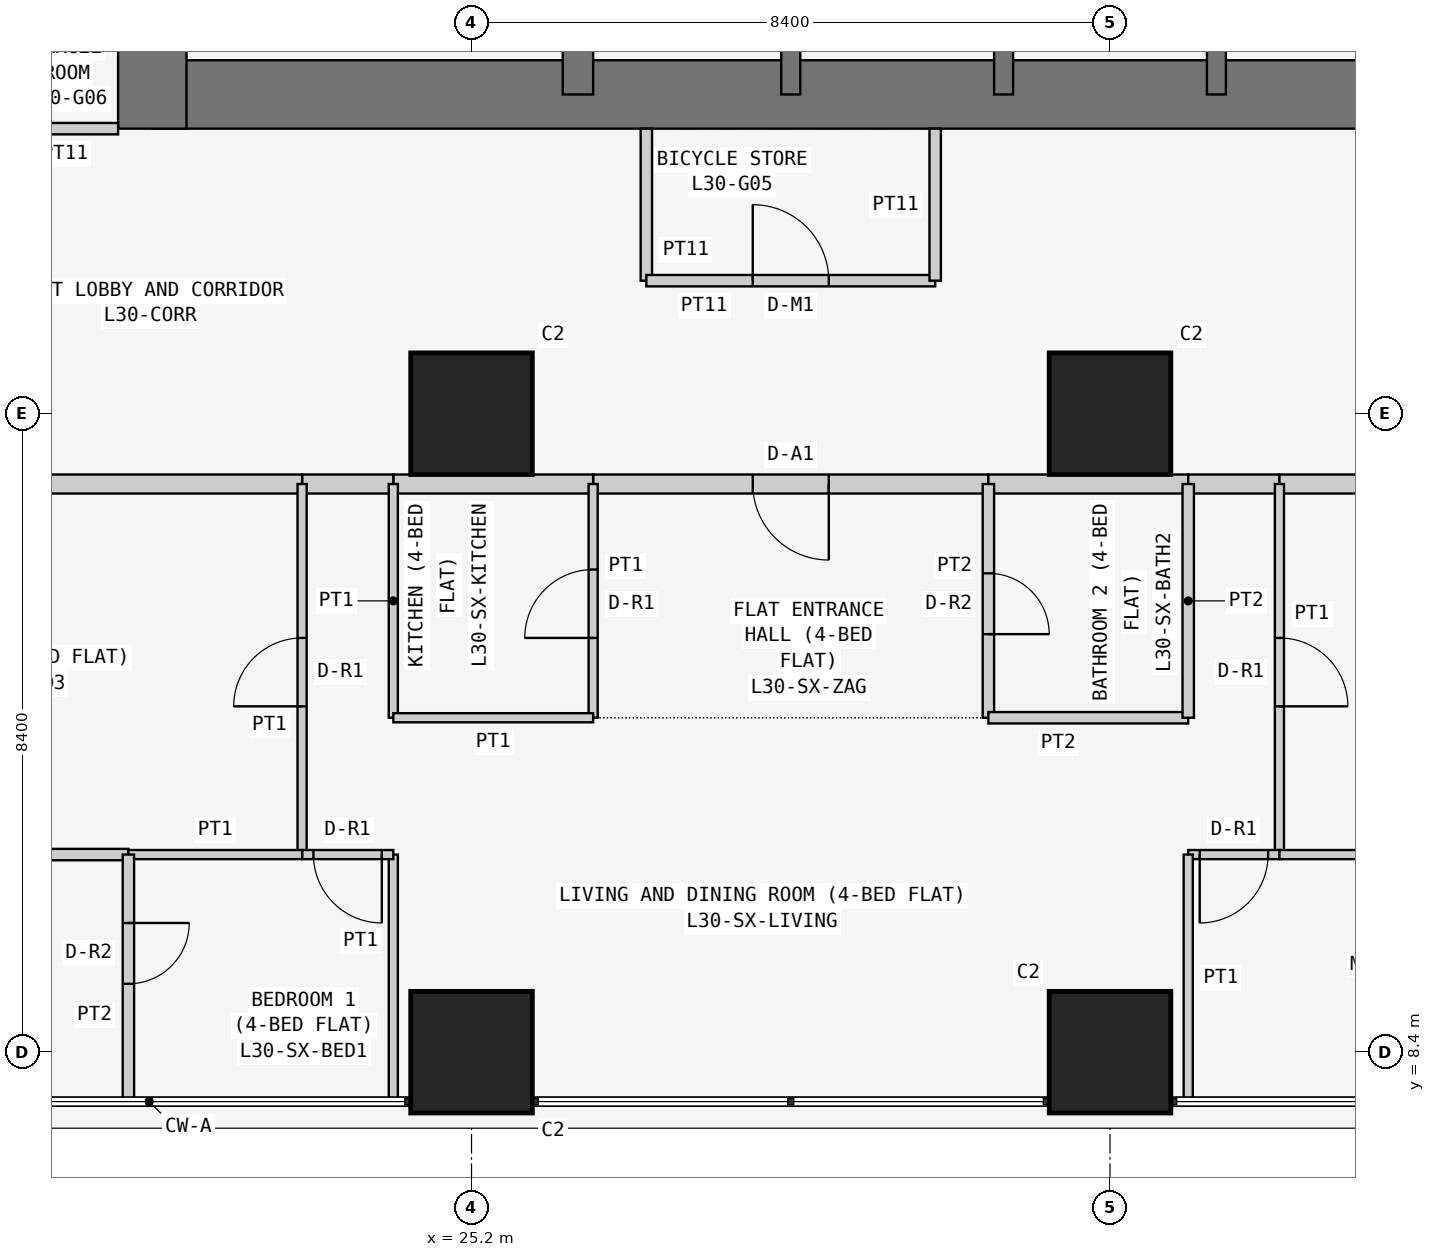
"""IFC4 building model, lengths in metres.
Left out: names, types, materials, properties, quantities, classifications, styles, units other than length and angle.
Written with IfcOpenShell. Run it as: python <this file> out.ifc"""

import sys

from ifc_helpers import new_model, si_unit, direction, frame, frame_2d, origin, origin_2d, place, context, subcontext, project, spatial, rectangle, extrude, element, fill, save


model = new_model("IFC4")
c1 = context("Model", 3, precision=1e-05, world=origin(), true_north=direction((0.0, 1.0)))
c2 = subcontext(c1, "Body", "Model", "MODEL_VIEW")
j1 = project(units=[si_unit("LENGTHUNIT", "METRE"), si_unit("PLANEANGLEUNIT", "RADIAN")], contexts=[c1])
p1 = place(None, origin())
s1 = spatial("IfcSite", under=j1, at=p1, CompositionType="ELEMENT")
p2 = place(p1, origin())
s2 = spatial("IfcBuilding", under=s1, at=p2, CompositionType="ELEMENT")
p3 = place(p2, frame((0.0, 0.0, 119.7)))
s3 = spatial("IfcBuildingStorey", under=s2, at=p3, CompositionType="ELEMENT", Elevation=119.7)
for number, where, z_axis, x_axis in (
    (1, (25.2, 8.4, 0.0), (0.0, 0.0, 1.0), (1.0, 0.0, 0.0)),
    (2, (25.2, 16.8, 0.0), (0.0, 0.0, 1.0), (1.0, 0.0, 0.0)),
    (3, (33.6, 8.4, 0.0), (0.0, 0.0, 1.0), (1.0, 0.0, 0.0)),
    (4, (33.6, 16.8, 0.0), (0.0, 0.0, 1.0), (1.0, 0.0, 0.0)),
):
    element("IfcColumn", number, at=place(p3, frame(where, z_axis=z_axis, x_axis=x_axis)), inside=s3, PredefinedType="COLUMN", context=c2, shape_type="SweptSolid", body=[
        extrude(rectangle(XDim=1.6, YDim=1.6, at=origin_2d()), origin(), (0.0, 0.0, 1.0), 3.6),
    ])
p4 = place(p3, frame((21.0, 21.0, 0.0), z_axis=(0.0, 0.0, 1.0), x_axis=(1.0, 0.0, 0.0)))
e5 = element("IfcWall", 5, at=p4, inside=s3, PredefinedType="SHEAR", context=c2, shape_type="SweptSolid", body=[
    extrude(rectangle(XDim=17.25, YDim=0.9, at=frame_2d((8.625, 0.0))), origin(), (0.0, 0.0, 1.0), 3.6),
])
p5 = place(p3, frame((21.0, 37.8, 0.0), z_axis=(0.0, 0.0, 1.0), x_axis=(0.0, -1.0, 0.0)))
e6 = element("IfcWall", 6, at=p5, inside=s3, PredefinedType="SHEAR", context=c2, shape_type="SweptSolid", body=[
    extrude(rectangle(XDim=17.25, YDim=0.9, at=frame_2d((8.625, 0.0))), origin(), (0.0, 0.0, 1.0), 3.6),
])
p6 = place(p5, frame((5.4, 0.0, 0.0)))
e7 = element("IfcOpeningElement", 7, at=p6, cuts=e6, PredefinedType="OPENING", context=c2, shape_type="SweptSolid", body=[
    extrude(rectangle(XDim=1.2, YDim=2.1, at=frame_2d((0.6, 1.05))), frame((0.0, 0.46, 0.0), z_axis=(0.0, -1.0, 0.0), x_axis=(1.0, 0.0, 0.0)), (0.0, 0.0, 1.0), 0.92),
])
p7 = place(p3, frame((26.6, 21.0, 0.0), z_axis=(0.0, 0.0, 1.0), x_axis=(0.0, 1.0, 0.0)))
e8 = element("IfcWall", 8, at=p7, inside=s3, PredefinedType="SHEAR", context=c2, shape_type="SweptSolid", body=[
    extrude(rectangle(XDim=16.8, YDim=0.4, at=frame_2d((8.4, 0.0))), origin(), (0.0, 0.0, 1.0), 3.6),
])
p8 = place(p7, frame((10.4, 0.0, 0.0)))
e9 = element("IfcOpeningElement", 9, at=p8, cuts=e8, PredefinedType="OPENING", context=c2, shape_type="SweptSolid", body=[
    extrude(rectangle(XDim=1.2, YDim=2.1, at=frame_2d((0.6, 1.05))), frame((0.0, 0.21, 0.0), z_axis=(0.0, -1.0, 0.0), x_axis=(1.0, 0.0, 0.0)), (0.0, 0.0, 1.0), 0.42),
])
for number, where, z_axis, x_axis in (
    (10, (29.4, 21.0, 0.0), (0.0, 0.0, 1.0), (0.0, 1.0, 0.0)),
    (11, (32.2, 21.0, 0.0), (0.0, 0.0, 1.0), (0.0, 1.0, 0.0)),
    (12, (35.0, 21.0, 0.0), (0.0, 0.0, 1.0), (0.0, 1.0, 0.0)),
):
    element("IfcWall", number, at=place(p3, frame(where, z_axis=z_axis, x_axis=x_axis)), inside=s3, PredefinedType="SHEAR", context=c2, shape_type="SweptSolid", body=[
        extrude(rectangle(XDim=3.2, YDim=0.25, at=frame_2d((1.6, 0.0))), origin(), (0.0, 0.0, 1.0), 3.6),
    ])
p9 = place(p3, frame((27.5, 20.55, 0.0), z_axis=(0.0, 0.0, 1.0), x_axis=(0.0, -1.0, 0.0)))
e13 = element("IfcWall", 13, at=p9, inside=s3, PredefinedType="PARTITIONING", context=c2, shape_type="SweptSolid", body=[
    extrude(rectangle(XDim=2.0, YDim=0.15, at=frame_2d((1.0, 0.0))), origin(), (0.0, 0.0, 1.0), 3.45),
])
p10 = place(p3, frame((27.5, 18.55, 0.0), z_axis=(0.0, 0.0, 1.0), x_axis=(1.0, 0.0, 0.0)))
e14 = element("IfcWall", 14, at=p10, inside=s3, PredefinedType="PARTITIONING", context=c2, shape_type="SweptSolid", body=[
    extrude(rectangle(XDim=3.8, YDim=0.15, at=frame_2d((1.9, 0.0))), origin(), (0.0, 0.0, 1.0), 3.45),
])
p11 = place(p10, frame((1.4, 0.0, 0.0)))
e15 = element("IfcOpeningElement", 15, at=p11, cuts=e14, PredefinedType="OPENING", context=c2, shape_type="SweptSolid", body=[
    extrude(rectangle(XDim=1.0, YDim=2.1, at=frame_2d((0.5, 1.05))), frame((0.0, 0.085, 0.0), z_axis=(0.0, -1.0, 0.0), x_axis=(1.0, 0.0, 0.0)), (0.0, 0.0, 1.0), 0.17),
])
p12 = place(p3, frame((31.3, 18.55, 0.0), z_axis=(0.0, 0.0, 1.0), x_axis=(0.0, 1.0, 0.0)))
e16 = element("IfcWall", 16, at=p12, inside=s3, PredefinedType="PARTITIONING", context=c2, shape_type="SweptSolid", body=[
    extrude(rectangle(XDim=2.0, YDim=0.15, at=frame_2d((1.0, 0.0))), origin(), (0.0, 0.0, 1.0), 3.45),
])
p13 = place(p3, frame((19.15, 20.55, 0.0), z_axis=(0.0, 0.0, 1.0), x_axis=(1.0, 0.0, 0.0)))
e17 = element("IfcWall", 17, at=p13, inside=s3, PredefinedType="PARTITIONING", context=c2, shape_type="SweptSolid", body=[
    extrude(rectangle(XDim=1.4, YDim=0.15, at=frame_2d((0.7, 0.0))), origin(), (0.0, 0.0, 1.0), 3.45),
])
p14 = place(p3, frame((32.0, 15.875, 0.0), z_axis=(0.0, 0.0, 1.0), x_axis=(-1.0, 0.0, 0.0)))
e18 = element("IfcWall", 18, at=p14, inside=s3, PredefinedType="PARTITIONING", context=c2, shape_type="SweptSolid", body=[
    extrude(rectangle(XDim=5.2, YDim=0.25, at=frame_2d((2.6, 0.0))), origin(), (0.0, 0.0, 1.0), 3.45),
])
p15 = place(p14, frame((2.1, 0.0, 0.0)))
e19 = element("IfcOpeningElement", 19, at=p15, cuts=e18, PredefinedType="OPENING", context=c2, shape_type="SweptSolid", body=[
    extrude(rectangle(XDim=1.0, YDim=2.1, at=frame_2d((0.5, 1.05))), frame((0.0, 0.135, 0.0), z_axis=(0.0, -1.0, 0.0), x_axis=(1.0, 0.0, 0.0)), (0.0, 0.0, 1.0), 0.27),
])
p16 = place(p3, frame((34.629, 15.875, 0.0), z_axis=(0.0, 0.0, 1.0), x_axis=(-1.0, 0.0, 0.0)))
e20 = element("IfcWall", 20, at=p16, inside=s3, PredefinedType="PARTITIONING", context=c2, shape_type="SweptSolid", body=[
    extrude(rectangle(XDim=2.629, YDim=0.25, at=frame_2d((1.314, 0.0))), origin(), (0.0, 0.0, 1.0), 3.45),
])
p17 = place(p3, frame((26.8, 15.875, 0.0), z_axis=(0.0, 0.0, 1.0), x_axis=(-1.0, 0.0, 0.0)))
e21 = element("IfcWall", 21, at=p17, inside=s3, PredefinedType="PARTITIONING", context=c2, shape_type="SweptSolid", body=[
    extrude(rectangle(XDim=2.629, YDim=0.25, at=frame_2d((1.314, 0.0))), origin(), (0.0, 0.0, 1.0), 3.45),
])
p18 = place(p3, frame((24.171, 15.875, 0.0), z_axis=(0.0, 0.0, 1.0), x_axis=(-1.0, 0.0, 0.0)))
e22 = element("IfcWall", 22, at=p18, inside=s3, PredefinedType="PARTITIONING", context=c2, shape_type="SweptSolid", body=[
    extrude(rectangle(XDim=1.2, YDim=0.25, at=frame_2d((0.6, 0.0))), origin(), (0.0, 0.0, 1.0), 3.45),
])
p19 = place(p3, frame((35.829, 15.875, 0.0), z_axis=(0.0, 0.0, 1.0), x_axis=(-1.0, 0.0, 0.0)))
e23 = element("IfcWall", 23, at=p19, inside=s3, PredefinedType="PARTITIONING", context=c2, shape_type="SweptSolid", body=[
    extrude(rectangle(XDim=1.2, YDim=0.25, at=frame_2d((0.6, 0.0))), origin(), (0.0, 0.0, 1.0), 3.45),
])
for number, where, z_axis, x_axis in (
    (24, (42.7, 15.875, 0.0), (0.0, 0.0, 1.0), (-1.0, 0.0, 0.0)),
    (25, (22.971, 15.875, 0.0), (0.0, 0.0, 1.0), (-1.0, 0.0, 0.0)),
):
    element("IfcWall", number, at=place(p3, frame(where, z_axis=z_axis, x_axis=x_axis)), inside=s3, PredefinedType="PARTITIONING", context=c2, shape_type="SweptSolid", body=[
        extrude(rectangle(XDim=6.871, YDim=0.25, at=frame_2d((3.436, 0.0))), origin(), (0.0, 0.0, 1.0), 3.45),
    ])
p20 = place(p3, frame((32.0, 12.8, 0.0), z_axis=(0.0, 0.0, 1.0), x_axis=(0.0, 1.0, 0.0)))
e26 = element("IfcWall", 26, at=p20, inside=s3, PredefinedType="PARTITIONING", context=c2, shape_type="SweptSolid", body=[
    extrude(rectangle(XDim=3.075, YDim=0.15, at=frame_2d((1.538, 0.0))), origin(), (0.0, 0.0, 1.0), 3.45),
])
p21 = place(p20, frame((1.1, 0.0, 0.0)))
e27 = element("IfcOpeningElement", 27, at=p21, cuts=e26, PredefinedType="OPENING", context=c2, shape_type="SweptSolid", body=[
    extrude(rectangle(XDim=0.8, YDim=2.1, at=frame_2d((0.4, 1.05))), frame((0.0, 0.085, 0.0), z_axis=(0.0, -1.0, 0.0), x_axis=(1.0, 0.0, 0.0)), (0.0, 0.0, 1.0), 0.17),
])
p22 = place(p3, frame((26.8, 15.875, 0.0), z_axis=(0.0, 0.0, 1.0), x_axis=(0.0, -1.0, 0.0)))
e28 = element("IfcWall", 28, at=p22, inside=s3, PredefinedType="PARTITIONING", context=c2, shape_type="SweptSolid", body=[
    extrude(rectangle(XDim=3.075, YDim=0.12, at=frame_2d((1.538, 0.0))), origin(), (0.0, 0.0, 1.0), 3.45),
])
p23 = place(p22, frame((1.125, 0.0, 0.0)))
e29 = element("IfcOpeningElement", 29, at=p23, cuts=e28, PredefinedType="OPENING", context=c2, shape_type="SweptSolid", body=[
    extrude(rectangle(XDim=0.9, YDim=2.1, at=frame_2d((0.45, 1.05))), frame((0.0, 0.07, 0.0), z_axis=(0.0, -1.0, 0.0), x_axis=(1.0, 0.0, 0.0)), (0.0, 0.0, 1.0), 0.14),
])
p24 = place(p3, frame((32.0, 12.8, 0.0), z_axis=(0.0, 0.0, 1.0), x_axis=(1.0, 0.0, 0.0)))
e30 = element("IfcWall", 30, at=p24, inside=s3, PredefinedType="PARTITIONING", context=c2, shape_type="SweptSolid", body=[
    extrude(rectangle(XDim=2.629, YDim=0.15, at=frame_2d((1.314, 0.0))), origin(), (0.0, 0.0, 1.0), 3.45),
])
p25 = place(p3, frame((34.629, 12.8, 0.0), z_axis=(0.0, 0.0, 1.0), x_axis=(0.0, 1.0, 0.0)))
e31 = element("IfcWall", 31, at=p25, inside=s3, PredefinedType="PARTITIONING", context=c2, shape_type="SweptSolid", body=[
    extrude(rectangle(XDim=3.075, YDim=0.15, at=frame_2d((1.538, 0.0))), origin(), (0.0, 0.0, 1.0), 3.45),
])
p26 = place(p3, frame((24.171, 15.875, 0.0), z_axis=(0.0, 0.0, 1.0), x_axis=(0.0, -1.0, 0.0)))
e32 = element("IfcWall", 32, at=p26, inside=s3, PredefinedType="PARTITIONING", context=c2, shape_type="SweptSolid", body=[
    extrude(rectangle(XDim=3.075, YDim=0.12, at=frame_2d((1.538, 0.0))), origin(), (0.0, 0.0, 1.0), 3.45),
])
p27 = place(p3, frame((24.171, 12.8, 0.0), z_axis=(0.0, 0.0, 1.0), x_axis=(1.0, 0.0, 0.0)))
e33 = element("IfcWall", 33, at=p27, inside=s3, PredefinedType="PARTITIONING", context=c2, shape_type="SweptSolid", body=[
    extrude(rectangle(XDim=2.629, YDim=0.12, at=frame_2d((1.314, 0.0))), origin(), (0.0, 0.0, 1.0), 3.45),
])
p28 = place(p3, frame((35.829, 15.875, 0.0), z_axis=(0.0, 0.0, 1.0), x_axis=(0.0, -1.0, 0.0)))
e34 = element("IfcWall", 34, at=p28, inside=s3, PredefinedType="PARTITIONING", context=c2, shape_type="SweptSolid", body=[
    extrude(rectangle(XDim=4.875, YDim=0.12, at=frame_2d((2.438, 0.0))), origin(), (0.0, 0.0, 1.0), 3.45),
])
p29 = place(p28, frame((2.025, 0.0, 0.0)))
e35 = element("IfcOpeningElement", 35, at=p29, cuts=e34, PredefinedType="OPENING", context=c2, shape_type="SweptSolid", body=[
    extrude(rectangle(XDim=0.9, YDim=2.1, at=frame_2d((0.45, 1.05))), frame((0.0, 0.07, 0.0), z_axis=(0.0, -1.0, 0.0), x_axis=(1.0, 0.0, 0.0)), (0.0, 0.0, 1.0), 0.14),
])
p30 = place(p3, frame((35.829, 11.0, 0.0), z_axis=(0.0, 0.0, 1.0), x_axis=(-1.0, 0.0, 0.0)))
e36 = element("IfcWall", 36, at=p30, inside=s3, PredefinedType="PARTITIONING", context=c2, shape_type="SweptSolid", body=[
    extrude(rectangle(XDim=1.2, YDim=0.12, at=frame_2d((0.6, 0.0))), origin(), (0.0, 0.0, 1.0), 3.45),
])
p31 = place(p30, frame((0.149, 0.0, 0.0)))
e37 = element("IfcOpeningElement", 37, at=p31, cuts=e36, PredefinedType="OPENING", context=c2, shape_type="SweptSolid", body=[
    extrude(rectangle(XDim=0.9, YDim=2.1, at=frame_2d((0.45, 1.05))), frame((0.0, 0.07, 0.0), z_axis=(0.0, -1.0, 0.0), x_axis=(1.0, 0.0, 0.0)), (0.0, 0.0, 1.0), 0.14),
])
p32 = place(p3, frame((34.629, 11.0, 0.0), z_axis=(0.0, 0.0, 1.0), x_axis=(0.0, -1.0, 0.0)))
e38 = element("IfcWall", 38, at=p32, inside=s3, PredefinedType="PARTITIONING", context=c2, shape_type="SweptSolid", body=[
    extrude(rectangle(XDim=3.25, YDim=0.12, at=frame_2d((1.625, 0.0))), origin(), (0.0, 0.0, 1.0), 3.45),
])
p33 = place(p3, frame((22.971, 11.0, 0.0), z_axis=(0.0, 0.0, 1.0), x_axis=(0.0, 1.0, 0.0)))
e39 = element("IfcWall", 39, at=p33, inside=s3, PredefinedType="PARTITIONING", context=c2, shape_type="SweptSolid", body=[
    extrude(rectangle(XDim=4.875, YDim=0.12, at=frame_2d((2.438, 0.0))), origin(), (0.0, 0.0, 1.0), 3.45),
])
p34 = place(p33, frame((1.95, 0.0, 0.0)))
e40 = element("IfcOpeningElement", 40, at=p34, cuts=e39, PredefinedType="OPENING", context=c2, shape_type="SweptSolid", body=[
    extrude(rectangle(XDim=0.9, YDim=2.1, at=frame_2d((0.45, 1.05))), frame((0.0, 0.07, 0.0), z_axis=(0.0, -1.0, 0.0), x_axis=(1.0, 0.0, 0.0)), (0.0, 0.0, 1.0), 0.14),
])
p35 = place(p3, frame((24.171, 7.75, 0.0), z_axis=(0.0, 0.0, 1.0), x_axis=(0.0, 1.0, 0.0)))
e41 = element("IfcWall", 41, at=p35, inside=s3, PredefinedType="PARTITIONING", context=c2, shape_type="SweptSolid", body=[
    extrude(rectangle(XDim=3.25, YDim=0.12, at=frame_2d((1.625, 0.0))), origin(), (0.0, 0.0, 1.0), 3.45),
])
p36 = place(p3, frame((24.171, 11.0, 0.0), z_axis=(0.0, 0.0, 1.0), x_axis=(-1.0, 0.0, 0.0)))
e42 = element("IfcWall", 42, at=p36, inside=s3, PredefinedType="PARTITIONING", context=c2, shape_type="SweptSolid", body=[
    extrude(rectangle(XDim=1.2, YDim=0.12, at=frame_2d((0.6, 0.0))), origin(), (0.0, 0.0, 1.0), 3.45),
])
p37 = place(p36, frame((0.151, 0.0, 0.0)))
e43 = element("IfcOpeningElement", 43, at=p37, cuts=e42, PredefinedType="OPENING", context=c2, shape_type="SweptSolid", body=[
    extrude(rectangle(XDim=0.9, YDim=2.1, at=frame_2d((0.45, 1.05))), frame((0.0, 0.07, 0.0), z_axis=(0.0, -1.0, 0.0), x_axis=(1.0, 0.0, 0.0)), (0.0, 0.0, 1.0), 0.14),
])
p38 = place(p3, frame((35.829, 11.0, 0.0), z_axis=(0.0, 0.0, 1.0), x_axis=(1.0, 0.0, 0.0)))
e44 = element("IfcWall", 44, at=p38, inside=s3, PredefinedType="PARTITIONING", context=c2, shape_type="SweptSolid", body=[
    extrude(rectangle(XDim=6.871, YDim=0.12, at=frame_2d((3.436, 0.0))), origin(), (0.0, 0.0, 1.0), 3.45),
])
p39 = place(p3, frame((16.1, 11.0, 0.0), z_axis=(0.0, 0.0, 1.0), x_axis=(1.0, 0.0, 0.0)))
e45 = element("IfcWall", 45, at=p39, inside=s3, PredefinedType="PARTITIONING", context=c2, shape_type="SweptSolid", body=[
    extrude(rectangle(XDim=4.586, YDim=0.15, at=frame_2d((2.293, 0.0))), origin(), (0.0, 0.0, 1.0), 3.45),
])
p40 = place(p3, frame((20.686, 11.0, 0.0), z_axis=(0.0, 0.0, 1.0), x_axis=(1.0, 0.0, 0.0)))
e46 = element("IfcWall", 46, at=p40, inside=s3, PredefinedType="PARTITIONING", context=c2, shape_type="SweptSolid", body=[
    extrude(rectangle(XDim=2.285, YDim=0.12, at=frame_2d((1.143, 0.0))), origin(), (0.0, 0.0, 1.0), 3.45),
])
p41 = place(p3, frame((20.686, 7.75, 0.0), z_axis=(0.0, 0.0, 1.0), x_axis=(0.0, 1.0, 0.0)))
e47 = element("IfcWall", 47, at=p41, inside=s3, PredefinedType="PARTITIONING", context=c2, shape_type="SweptSolid", body=[
    extrude(rectangle(XDim=3.25, YDim=0.15, at=frame_2d((1.625, 0.0))), origin(), (0.0, 0.0, 1.0), 3.45),
])
p42 = place(p41, frame((1.55, 0.0, 0.0)))
e48 = element("IfcOpeningElement", 48, at=p42, cuts=e47, PredefinedType="OPENING", context=c2, shape_type="SweptSolid", body=[
    extrude(rectangle(XDim=0.8, YDim=2.1, at=frame_2d((0.4, 1.05))), frame((0.0, 0.085, 0.0), z_axis=(0.0, -1.0, 0.0), x_axis=(1.0, 0.0, 0.0)), (0.0, 0.0, 1.0), 0.17),
])
p43 = place(p11, origin())
e49 = element("IfcDoor", 49, at=p43, inside=s3, OperationType="SINGLE_SWING_LEFT", PredefinedType="DOOR", context=c2, shape_type="SweptSolid", body=[
    extrude(rectangle(XDim=1.0, YDim=2.1, at=frame_2d((0.5, 1.05))), frame((0.0, 0.025, 0.0), z_axis=(0.0, -1.0, 0.0), x_axis=(1.0, 0.0, 0.0)), (0.0, 0.0, 1.0), 0.05),
])
fill(e15, e49)
p44 = place(p15, origin())
e50 = element("IfcDoor", 50, at=p44, inside=s3, OperationType="SINGLE_SWING_LEFT", PredefinedType="DOOR", context=c2, shape_type="SweptSolid", body=[
    extrude(rectangle(XDim=1.0, YDim=2.1, at=frame_2d((0.5, 1.05))), frame((0.0, 0.025, 0.0), z_axis=(0.0, -1.0, 0.0), x_axis=(1.0, 0.0, 0.0)), (0.0, 0.0, 1.0), 0.05),
])
fill(e19, e50)
p45 = place(p21, frame((0.8, 0.0, 0.0), z_axis=(0.0, 0.0, 1.0), x_axis=(-1.0, 0.0, 0.0)))
e51 = element("IfcDoor", 51, at=p45, inside=s3, OperationType="SINGLE_SWING_RIGHT", PredefinedType="DOOR", context=c2, shape_type="SweptSolid", body=[
    extrude(rectangle(XDim=0.8, YDim=2.1, at=frame_2d((0.4, 1.05))), frame((0.0, 0.025, 0.0), z_axis=(0.0, -1.0, 0.0), x_axis=(1.0, 0.0, 0.0)), (0.0, 0.0, 1.0), 0.05),
])
fill(e27, e51)
p46 = place(p23, frame((0.9, 0.0, 0.0), z_axis=(0.0, 0.0, 1.0), x_axis=(-1.0, 0.0, 0.0)))
e52 = element("IfcDoor", 52, at=p46, inside=s3, OperationType="SINGLE_SWING_LEFT", PredefinedType="DOOR", context=c2, shape_type="SweptSolid", body=[
    extrude(rectangle(XDim=0.9, YDim=2.1, at=frame_2d((0.45, 1.05))), frame((0.0, 0.025, 0.0), z_axis=(0.0, -1.0, 0.0), x_axis=(1.0, 0.0, 0.0)), (0.0, 0.0, 1.0), 0.05),
])
fill(e29, e52)
p47 = place(p29, origin())
e53 = element("IfcDoor", 53, at=p47, inside=s3, OperationType="SINGLE_SWING_RIGHT", PredefinedType="DOOR", context=c2, shape_type="SweptSolid", body=[
    extrude(rectangle(XDim=0.9, YDim=2.1, at=frame_2d((0.45, 1.05))), frame((0.0, 0.025, 0.0), z_axis=(0.0, -1.0, 0.0), x_axis=(1.0, 0.0, 0.0)), (0.0, 0.0, 1.0), 0.05),
])
fill(e35, e53)
p48 = place(p31, origin())
e54 = element("IfcDoor", 54, at=p48, inside=s3, OperationType="SINGLE_SWING_RIGHT", PredefinedType="DOOR", context=c2, shape_type="SweptSolid", body=[
    extrude(rectangle(XDim=0.9, YDim=2.1, at=frame_2d((0.45, 1.05))), frame((0.0, 0.025, 0.0), z_axis=(0.0, -1.0, 0.0), x_axis=(1.0, 0.0, 0.0)), (0.0, 0.0, 1.0), 0.05),
])
fill(e37, e54)
p49 = place(p34, origin())
e55 = element("IfcDoor", 55, at=p49, inside=s3, OperationType="SINGLE_SWING_LEFT", PredefinedType="DOOR", context=c2, shape_type="SweptSolid", body=[
    extrude(rectangle(XDim=0.9, YDim=2.1, at=frame_2d((0.45, 1.05))), frame((0.0, 0.025, 0.0), z_axis=(0.0, -1.0, 0.0), x_axis=(1.0, 0.0, 0.0)), (0.0, 0.0, 1.0), 0.05),
])
fill(e40, e55)
p50 = place(p37, origin())
e56 = element("IfcDoor", 56, at=p50, inside=s3, OperationType="SINGLE_SWING_LEFT", PredefinedType="DOOR", context=c2, shape_type="SweptSolid", body=[
    extrude(rectangle(XDim=0.9, YDim=2.1, at=frame_2d((0.45, 1.05))), frame((0.0, 0.025, 0.0), z_axis=(0.0, -1.0, 0.0), x_axis=(1.0, 0.0, 0.0)), (0.0, 0.0, 1.0), 0.05),
])
fill(e43, e56)
p51 = place(p42, frame((0.8, 0.0, 0.0), z_axis=(0.0, 0.0, 1.0), x_axis=(-1.0, 0.0, 0.0)))
e57 = element("IfcDoor", 57, at=p51, inside=s3, OperationType="SINGLE_SWING_LEFT", PredefinedType="DOOR", context=c2, shape_type="SweptSolid", body=[
    extrude(rectangle(XDim=0.8, YDim=2.1, at=frame_2d((0.4, 1.05))), frame((0.0, 0.025, 0.0), z_axis=(0.0, -1.0, 0.0), x_axis=(1.0, 0.0, 0.0)), (0.0, 0.0, 1.0), 0.05),
])
fill(e48, e57)
save(model, sys.argv[1])
